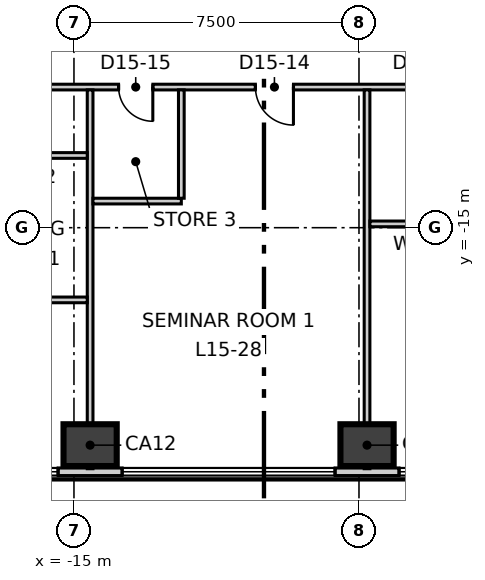
"""IFC4 building model, lengths in metres.
Left out: names, types, materials, properties, quantities, classifications, styles, units other than length and angle.
Written with IfcOpenShell. Run it as: python <this file> out.ifc"""

import sys

from ifc_helpers import new_model, si_unit, direction, frame, frame_2d, origin, origin_2d, place, context, subcontext, project, spatial, rectangle, extrude, element, fill, save


model = new_model("IFC4")
c1 = context("Model", 3, precision=1e-05, world=origin(), true_north=direction((0.0, 1.0)))
c2 = subcontext(c1, "Body", "Model", "MODEL_VIEW")
j1 = project(units=[si_unit("LENGTHUNIT", "METRE"), si_unit("PLANEANGLEUNIT", "RADIAN")], contexts=[c1])
p1 = place(None, origin())
s1 = spatial("IfcSite", under=j1, at=p1, CompositionType="ELEMENT")
p2 = place(p1, origin())
s2 = spatial("IfcBuilding", under=s1, at=p2, CompositionType="ELEMENT")
p3 = place(p2, frame((0.0, 0.0, 71.3)))
s3 = spatial("IfcBuildingStorey", under=s2, at=p3, CompositionType="ELEMENT", Elevation=71.3)
for number, where, z_axis, x_axis in (
    (1, (-14.575, -20.722, -0.3), (0.0, 0.0, 1.0), (1.0, 0.0, 0.0)),
    (2, (-7.288, -20.722, -0.3), (0.0, 0.0, 1.0), (1.0, 0.0, 0.0)),
):
    element("IfcColumn", number, at=place(p3, frame(where, z_axis=z_axis, x_axis=x_axis)), inside=s3, PredefinedType="COLUMN", context=c2, shape_type="SweptSolid", body=[
        extrude(rectangle(XDim=1.4, YDim=1.1, at=origin_2d()), origin(), (0.0, 0.0, 1.0), 4.0),
    ])
p4 = place(p3, frame((-3.326, 37.084, 0.0), z_axis=(0.0, 0.0, 1.0), x_axis=(-0.500000131003, -0.86602532815, 0.0)))
e3 = element("IfcWall", 3, at=p4, inside=s3, PredefinedType="ELEMENTEDWALL", context=c2, shape_type="SweptSolid", body=[
    extrude(rectangle(XDim=60.886, YDim=0.2, at=frame_2d((30.443, 0.0))), origin(), (0.0, 0.0, 1.0), 3.7),
])
p5 = place(p4, frame((2.146, 0.0, 0.9)))
e4 = element("IfcOpeningElement", 4, at=p5, cuts=e3, PredefinedType="OPENING", context=c2, shape_type="SweptSolid", body=[
    extrude(rectangle(XDim=5.6, YDim=2.5, at=frame_2d((2.8, 1.25))), frame((0.0, 0.11, 0.0), z_axis=(0.0, -1.0, 0.0), x_axis=(1.0, 0.0, 0.0)), (0.0, 0.0, 1.0), 0.22),
])
p6 = place(p4, frame((9.434, 0.0, 0.9)))
e5 = element("IfcOpeningElement", 5, at=p6, cuts=e3, PredefinedType="OPENING", context=c2, shape_type="SweptSolid", body=[
    extrude(rectangle(XDim=5.6, YDim=2.5, at=frame_2d((2.8, 1.25))), frame((0.0, 0.11, 0.0), z_axis=(0.0, -1.0, 0.0), x_axis=(1.0, 0.0, 0.0)), (0.0, 0.0, 1.0), 0.22),
])
p7 = place(p4, frame((16.721, 0.0, 0.9)))
e6 = element("IfcOpeningElement", 6, at=p7, cuts=e3, PredefinedType="OPENING", context=c2, shape_type="SweptSolid", body=[
    extrude(rectangle(XDim=5.6, YDim=2.5, at=frame_2d((2.8, 1.25))), frame((0.0, 0.11, 0.0), z_axis=(0.0, -1.0, 0.0), x_axis=(1.0, 0.0, 0.0)), (0.0, 0.0, 1.0), 0.22),
])
p8 = place(p4, frame((24.009, 0.0, 0.9)))
e7 = element("IfcOpeningElement", 7, at=p8, cuts=e3, PredefinedType="OPENING", context=c2, shape_type="SweptSolid", body=[
    extrude(rectangle(XDim=5.6, YDim=2.5, at=frame_2d((2.8, 1.25))), frame((0.0, 0.11, 0.0), z_axis=(0.0, -1.0, 0.0), x_axis=(1.0, 0.0, 0.0)), (0.0, 0.0, 1.0), 0.22),
])
p9 = place(p4, frame((31.297, 0.0, 0.9)))
e8 = element("IfcOpeningElement", 8, at=p9, cuts=e3, PredefinedType="OPENING", context=c2, shape_type="SweptSolid", body=[
    extrude(rectangle(XDim=5.6, YDim=2.5, at=frame_2d((2.8, 1.25))), frame((0.0, 0.11, 0.0), z_axis=(0.0, -1.0, 0.0), x_axis=(1.0, 0.0, 0.0)), (0.0, 0.0, 1.0), 0.22),
])
p10 = place(p4, frame((38.584, 0.0, 0.9)))
e9 = element("IfcOpeningElement", 9, at=p10, cuts=e3, PredefinedType="OPENING", context=c2, shape_type="SweptSolid", body=[
    extrude(rectangle(XDim=5.6, YDim=2.5, at=frame_2d((2.8, 1.25))), frame((0.0, 0.11, 0.0), z_axis=(0.0, -1.0, 0.0), x_axis=(1.0, 0.0, 0.0)), (0.0, 0.0, 1.0), 0.22),
])
p11 = place(p4, frame((45.872, 0.0, 0.9)))
e10 = element("IfcOpeningElement", 10, at=p11, cuts=e3, PredefinedType="OPENING", context=c2, shape_type="SweptSolid", body=[
    extrude(rectangle(XDim=5.6, YDim=2.5, at=frame_2d((2.8, 1.25))), frame((0.0, 0.11, 0.0), z_axis=(0.0, -1.0, 0.0), x_axis=(1.0, 0.0, 0.0)), (0.0, 0.0, 1.0), 0.22),
])
p12 = place(p4, frame((53.159, 0.0, 0.9)))
e11 = element("IfcOpeningElement", 11, at=p12, cuts=e3, PredefinedType="OPENING", context=c2, shape_type="SweptSolid", body=[
    extrude(rectangle(XDim=5.6, YDim=2.5, at=frame_2d((2.8, 1.25))), frame((0.0, 0.11, 0.0), z_axis=(0.0, -1.0, 0.0), x_axis=(1.0, 0.0, 0.0)), (0.0, 0.0, 1.0), 0.22),
])
p13 = place(p3, frame((-30.453, -21.422, 0.0), z_axis=(0.0, 0.0, 1.0), x_axis=(1.0, 0.0, 0.0)))
e12 = element("IfcWall", 12, at=p13, inside=s3, PredefinedType="ELEMENTEDWALL", context=c2, shape_type="SweptSolid", body=[
    extrude(rectangle(XDim=60.886, YDim=0.2, at=frame_2d((30.443, 0.0))), origin(), (0.0, 0.0, 1.0), 3.7),
])
p14 = place(p13, frame((2.147, 0.0, 0.9)))
e13 = element("IfcOpeningElement", 13, at=p14, cuts=e12, PredefinedType="OPENING", context=c2, shape_type="SweptSolid", body=[
    extrude(rectangle(XDim=5.6, YDim=2.5, at=frame_2d((2.8, 1.25))), frame((0.0, 0.11, 0.0), z_axis=(0.0, -1.0, 0.0), x_axis=(1.0, 0.0, 0.0)), (0.0, 0.0, 1.0), 0.22),
])
p15 = place(p13, frame((9.434, 0.0, 0.9)))
e14 = element("IfcOpeningElement", 14, at=p15, cuts=e12, PredefinedType="OPENING", context=c2, shape_type="SweptSolid", body=[
    extrude(rectangle(XDim=5.6, YDim=2.5, at=frame_2d((2.8, 1.25))), frame((0.0, 0.11, 0.0), z_axis=(0.0, -1.0, 0.0), x_axis=(1.0, 0.0, 0.0)), (0.0, 0.0, 1.0), 0.22),
])
p16 = place(p13, frame((16.722, 0.0, 0.9)))
e15 = element("IfcOpeningElement", 15, at=p16, cuts=e12, PredefinedType="OPENING", context=c2, shape_type="SweptSolid", body=[
    extrude(rectangle(XDim=5.6, YDim=2.5, at=frame_2d((2.8, 1.25))), frame((0.0, 0.11, 0.0), z_axis=(0.0, -1.0, 0.0), x_axis=(1.0, 0.0, 0.0)), (0.0, 0.0, 1.0), 0.22),
])
p17 = place(p13, frame((24.009, 0.0, 0.9)))
e16 = element("IfcOpeningElement", 16, at=p17, cuts=e12, PredefinedType="OPENING", context=c2, shape_type="SweptSolid", body=[
    extrude(rectangle(XDim=5.6, YDim=2.5, at=frame_2d((2.8, 1.25))), frame((0.0, 0.11, 0.0), z_axis=(0.0, -1.0, 0.0), x_axis=(1.0, 0.0, 0.0)), (0.0, 0.0, 1.0), 0.22),
])
p18 = place(p13, frame((31.297, 0.0, 0.9)))
e17 = element("IfcOpeningElement", 17, at=p18, cuts=e12, PredefinedType="OPENING", context=c2, shape_type="SweptSolid", body=[
    extrude(rectangle(XDim=5.6, YDim=2.5, at=frame_2d((2.8, 1.25))), frame((0.0, 0.11, 0.0), z_axis=(0.0, -1.0, 0.0), x_axis=(1.0, 0.0, 0.0)), (0.0, 0.0, 1.0), 0.22),
])
p19 = place(p13, frame((38.584, 0.0, 0.9)))
e18 = element("IfcOpeningElement", 18, at=p19, cuts=e12, PredefinedType="OPENING", context=c2, shape_type="SweptSolid", body=[
    extrude(rectangle(XDim=5.6, YDim=2.5, at=frame_2d((2.8, 1.25))), frame((0.0, 0.11, 0.0), z_axis=(0.0, -1.0, 0.0), x_axis=(1.0, 0.0, 0.0)), (0.0, 0.0, 1.0), 0.22),
])
p20 = place(p13, frame((45.872, 0.0, 0.9)))
e19 = element("IfcOpeningElement", 19, at=p20, cuts=e12, PredefinedType="OPENING", context=c2, shape_type="SweptSolid", body=[
    extrude(rectangle(XDim=5.6, YDim=2.5, at=frame_2d((2.8, 1.25))), frame((0.0, 0.11, 0.0), z_axis=(0.0, -1.0, 0.0), x_axis=(1.0, 0.0, 0.0)), (0.0, 0.0, 1.0), 0.22),
])
p21 = place(p13, frame((53.159, 0.0, 0.9)))
e20 = element("IfcOpeningElement", 20, at=p21, cuts=e12, PredefinedType="OPENING", context=c2, shape_type="SweptSolid", body=[
    extrude(rectangle(XDim=5.6, YDim=2.5, at=frame_2d((2.8, 1.25))), frame((0.0, 0.11, 0.0), z_axis=(0.0, -1.0, 0.0), x_axis=(1.0, 0.0, 0.0)), (0.0, 0.0, 1.0), 0.22),
])
p22 = place(p3, frame((-19.497, -11.17, 0.0), z_axis=(0.0, 0.0, 1.0), x_axis=(0.499998854553, 0.866026065108, 0.0)))
e21 = element("IfcWall", 21, at=p22, inside=s3, PredefinedType="PARTITIONING", context=c2, shape_type="SweptSolid", body=[
    extrude(rectangle(XDim=38.994, YDim=0.15, at=frame_2d((19.497, 0.0))), origin(), (0.0, 0.0, 1.0), 3.7),
])
p23 = place(p22, frame((35.944, 0.0, 0.0)))
e22 = element("IfcOpeningElement", 22, at=p23, cuts=e21, PredefinedType="OPENING", context=c2, shape_type="SweptSolid", body=[
    extrude(rectangle(XDim=1.1, YDim=2.1, at=frame_2d((0.55, 1.05))), frame((0.0, 0.085, 0.0), z_axis=(0.0, -1.0, 0.0), x_axis=(1.0, 0.0, 0.0)), (0.0, 0.0, 1.0), 0.17),
])
p24 = place(p22, frame((26.148, 0.0, 0.0)))
e23 = element("IfcOpeningElement", 23, at=p24, cuts=e21, PredefinedType="OPENING", context=c2, shape_type="SweptSolid", body=[
    extrude(rectangle(XDim=1.1, YDim=2.1, at=frame_2d((0.55, 1.05))), frame((0.0, 0.085, 0.0), z_axis=(0.0, -1.0, 0.0), x_axis=(1.0, 0.0, 0.0)), (0.0, 0.0, 1.0), 0.17),
])
p25 = place(p22, frame((8.572, 0.0, 0.0)))
e24 = element("IfcOpeningElement", 24, at=p25, cuts=e21, PredefinedType="OPENING", context=c2, shape_type="SweptSolid", body=[
    extrude(rectangle(XDim=1.1, YDim=2.1, at=frame_2d((0.55, 1.05))), frame((0.0, 0.085, 0.0), z_axis=(0.0, -1.0, 0.0), x_axis=(1.0, 0.0, 0.0)), (0.0, 0.0, 1.0), 0.17),
])
p26 = place(p22, frame((17.172, 0.0, 0.0)))
e25 = element("IfcOpeningElement", 25, at=p26, cuts=e21, PredefinedType="OPENING", context=c2, shape_type="SweptSolid", body=[
    extrude(rectangle(XDim=0.9, YDim=2.1, at=frame_2d((0.45, 1.05))), frame((0.0, 0.085, 0.0), z_axis=(0.0, -1.0, 0.0), x_axis=(1.0, 0.0, 0.0)), (0.0, 0.0, 1.0), 0.17),
])
p27 = place(p22, frame((14.172, 0.0, 0.0)))
e26 = element("IfcOpeningElement", 26, at=p27, cuts=e21, PredefinedType="OPENING", context=c2, shape_type="SweptSolid", body=[
    extrude(rectangle(XDim=0.9, YDim=2.1, at=frame_2d((0.45, 1.05))), frame((0.0, 0.085, 0.0), z_axis=(0.0, -1.0, 0.0), x_axis=(1.0, 0.0, 0.0)), (0.0, 0.0, 1.0), 0.17),
])
p28 = place(p22, frame((1.797, 0.0, 0.0)))
e27 = element("IfcOpeningElement", 27, at=p28, cuts=e21, PredefinedType="OPENING", context=c2, shape_type="SweptSolid", body=[
    extrude(rectangle(XDim=1.1, YDim=2.1, at=frame_2d((0.55, 1.05))), frame((0.0, 0.085, 0.0), z_axis=(0.0, -1.0, 0.0), x_axis=(1.0, 0.0, 0.0)), (0.0, 0.0, 1.0), 0.17),
])
p29 = place(p3, frame((-19.422, -11.3, 0.0), z_axis=(0.0, 0.0, 1.0), x_axis=(1.0, 0.0, 0.0)))
e28 = element("IfcWall", 28, at=p29, inside=s3, PredefinedType="PARTITIONING", context=c2, shape_type="SweptSolid", body=[
    extrude(rectangle(XDim=38.994, YDim=0.15, at=frame_2d((19.497, 0.0))), origin(), (0.0, 0.0, 1.0), 3.7),
])
p30 = place(p29, frame((1.8, 0.0, 0.0)))
e29 = element("IfcOpeningElement", 29, at=p30, cuts=e28, PredefinedType="OPENING", context=c2, shape_type="SweptSolid", body=[
    extrude(rectangle(XDim=1.1, YDim=2.1, at=frame_2d((0.55, 1.05))), frame((0.0, 0.085, 0.0), z_axis=(0.0, -1.0, 0.0), x_axis=(1.0, 0.0, 0.0)), (0.0, 0.0, 1.0), 0.17),
])
p31 = place(p29, frame((9.197, 0.0, 0.0)))
e30 = element("IfcOpeningElement", 30, at=p31, cuts=e28, PredefinedType="OPENING", context=c2, shape_type="SweptSolid", body=[
    extrude(rectangle(XDim=1.0, YDim=2.1, at=frame_2d((0.5, 1.05))), frame((0.0, 0.085, 0.0), z_axis=(0.0, -1.0, 0.0), x_axis=(1.0, 0.0, 0.0)), (0.0, 0.0, 1.0), 0.17),
])
p32 = place(p29, frame((5.597, 0.0, 0.0)))
e31 = element("IfcOpeningElement", 31, at=p32, cuts=e28, PredefinedType="OPENING", context=c2, shape_type="SweptSolid", body=[
    extrude(rectangle(XDim=0.9, YDim=2.1, at=frame_2d((0.45, 1.05))), frame((0.0, 0.085, 0.0), z_axis=(0.0, -1.0, 0.0), x_axis=(1.0, 0.0, 0.0)), (0.0, 0.0, 1.0), 0.17),
])
p33 = place(p29, frame((23.284, 0.0, 0.0)))
e32 = element("IfcOpeningElement", 32, at=p33, cuts=e28, PredefinedType="OPENING", context=c2, shape_type="SweptSolid", body=[
    extrude(rectangle(XDim=1.1, YDim=2.1, at=frame_2d((0.55, 1.05))), frame((0.0, 0.085, 0.0), z_axis=(0.0, -1.0, 0.0), x_axis=(1.0, 0.0, 0.0)), (0.0, 0.0, 1.0), 0.17),
])
p34 = place(p29, frame((13.284, 0.0, 0.0)))
e33 = element("IfcOpeningElement", 33, at=p34, cuts=e28, PredefinedType="OPENING", context=c2, shape_type="SweptSolid", body=[
    extrude(rectangle(XDim=0.9, YDim=2.1, at=frame_2d((0.45, 1.05))), frame((0.0, 0.085, 0.0), z_axis=(0.0, -1.0, 0.0), x_axis=(1.0, 0.0, 0.0)), (0.0, 0.0, 1.0), 0.17),
])
p35 = place(p29, frame((16.484, 0.0, 0.0)))
e34 = element("IfcOpeningElement", 34, at=p35, cuts=e28, PredefinedType="OPENING", context=c2, shape_type="SweptSolid", body=[
    extrude(rectangle(XDim=0.9, YDim=2.1, at=frame_2d((0.45, 1.05))), frame((0.0, 0.085, 0.0), z_axis=(0.0, -1.0, 0.0), x_axis=(1.0, 0.0, 0.0)), (0.0, 0.0, 1.0), 0.17),
])
p36 = place(p29, frame((19.184, 0.0, 0.0)))
e35 = element("IfcOpeningElement", 35, at=p36, cuts=e28, PredefinedType="OPENING", context=c2, shape_type="SweptSolid", body=[
    extrude(rectangle(XDim=1.0, YDim=2.1, at=frame_2d((0.5, 1.05))), frame((0.0, 0.085, 0.0), z_axis=(0.0, -1.0, 0.0), x_axis=(1.0, 0.0, 0.0)), (0.0, 0.0, 1.0), 0.17),
])
p37 = place(p29, frame((29.86, 0.0, 0.0)))
e36 = element("IfcOpeningElement", 36, at=p37, cuts=e28, PredefinedType="OPENING", context=c2, shape_type="SweptSolid", body=[
    extrude(rectangle(XDim=1.0, YDim=2.1, at=frame_2d((0.5, 1.05))), frame((0.0, 0.085, 0.0), z_axis=(0.0, -1.0, 0.0), x_axis=(1.0, 0.0, 0.0)), (0.0, 0.0, 1.0), 0.17),
])
p38 = place(p29, frame((35.947, 0.0, 0.0)))
e37 = element("IfcOpeningElement", 37, at=p38, cuts=e28, PredefinedType="OPENING", context=c2, shape_type="SweptSolid", body=[
    extrude(rectangle(XDim=1.0, YDim=2.1, at=frame_2d((0.5, 1.05))), frame((0.0, 0.085, 0.0), z_axis=(0.0, -1.0, 0.0), x_axis=(1.0, 0.0, 0.0)), (0.0, 0.0, 1.0), 0.17),
])
p39 = place(p3, frame((-14.575, -21.342, 0.0), z_axis=(0.0, 0.0, 1.0), x_axis=(0.0, 1.0, 0.0)))
e38 = element("IfcWall", 38, at=p39, inside=s3, PredefinedType="PARTITIONING", context=c2, shape_type="SweptSolid", body=[
    extrude(rectangle(XDim=9.967, YDim=0.15, at=frame_2d((4.983, 0.0))), origin(), (0.0, 0.0, 1.0), 3.7),
])
p40 = place(p3, frame((-14.5, -14.3, 0.0), z_axis=(0.0, 0.0, 1.0), x_axis=(1.0, 0.0, 0.0)))
e39 = element("IfcWall", 39, at=p40, inside=s3, PredefinedType="PARTITIONING", context=c2, shape_type="SweptSolid", body=[
    extrude(rectangle(XDim=2.325, YDim=0.15, at=frame_2d((1.163, 0.0))), origin(), (0.0, 0.0, 1.0), 3.7),
])
p41 = place(p3, frame((-12.175, -14.225, 0.0), z_axis=(0.0, 0.0, 1.0), x_axis=(0.0, 1.0, 0.0)))
e40 = element("IfcWall", 40, at=p41, inside=s3, PredefinedType="PARTITIONING", context=c2, shape_type="SweptSolid", body=[
    extrude(rectangle(XDim=2.85, YDim=0.15, at=frame_2d((1.425, 0.0))), origin(), (0.0, 0.0, 1.0), 3.7),
])
p42 = place(p3, frame((-7.288, -21.342, 0.0), z_axis=(0.0, 0.0, 1.0), x_axis=(0.0, 1.0, 0.0)))
e41 = element("IfcWall", 41, at=p42, inside=s3, PredefinedType="PARTITIONING", context=c2, shape_type="SweptSolid", body=[
    extrude(rectangle(XDim=9.967, YDim=0.15, at=frame_2d((4.983, 0.0))), origin(), (0.0, 0.0, 1.0), 3.7),
])
p43 = place(p3, frame((-7.213, -14.9, 0.0), z_axis=(0.0, 0.0, 1.0), x_axis=(1.0, 0.0, 0.0)))
e42 = element("IfcWall", 42, at=p43, inside=s3, PredefinedType="PARTITIONING", context=c2, shape_type="SweptSolid", body=[
    extrude(rectangle(XDim=8.725, YDim=0.15, at=frame_2d((4.362, 0.0))), origin(), (0.0, 0.0, 1.0), 3.7),
])
p44 = place(p3, frame((-20.375, -13.1, 0.0), z_axis=(0.0, 0.0, 1.0), x_axis=(1.0, 0.0, 0.0)))
e43 = element("IfcWall", 43, at=p44, inside=s3, PredefinedType="PARTITIONING", context=c2, shape_type="SweptSolid", body=[
    extrude(rectangle(XDim=5.725, YDim=0.15, at=frame_2d((2.863, 0.0))), origin(), (0.0, 0.0, 1.0), 3.7),
])
p45 = place(p44, frame((3.55, 0.0, 0.0)))
e44 = element("IfcOpeningElement", 44, at=p45, cuts=e43, PredefinedType="OPENING", context=c2, shape_type="SweptSolid", body=[
    extrude(rectangle(XDim=0.9, YDim=2.1, at=frame_2d((0.45, 1.05))), frame((0.0, 0.085, 0.0), z_axis=(0.0, -1.0, 0.0), x_axis=(1.0, 0.0, 0.0)), (0.0, 0.0, 1.0), 0.17),
])
p46 = place(p3, frame((-18.1, -16.9, 0.0), z_axis=(0.0, 0.0, 1.0), x_axis=(1.0, 0.0, 0.0)))
e45 = element("IfcWall", 45, at=p46, inside=s3, PredefinedType="PARTITIONING", context=c2, shape_type="SweptSolid", body=[
    extrude(rectangle(XDim=3.45, YDim=0.15, at=frame_2d((1.725, 0.0))), origin(), (0.0, 0.0, 1.0), 3.7),
])
p47 = place(p15, origin())
e46 = element("IfcWindow", 46, at=p47, inside=s3, PartitioningType="SINGLE_PANEL", PredefinedType="WINDOW", context=c2, shape_type="SweptSolid", body=[
    extrude(rectangle(XDim=5.6, YDim=2.5, at=frame_2d((2.8, 1.25))), frame((0.0, 0.03, 0.0), z_axis=(0.0, -1.0, 0.0), x_axis=(1.0, 0.0, 0.0)), (0.0, 0.0, 1.0), 0.06),
])
fill(e14, e46)
p48 = place(p16, origin())
e47 = element("IfcWindow", 47, at=p48, inside=s3, PartitioningType="SINGLE_PANEL", PredefinedType="WINDOW", context=c2, shape_type="SweptSolid", body=[
    extrude(rectangle(XDim=5.6, YDim=2.5, at=frame_2d((2.8, 1.25))), frame((0.0, 0.03, 0.0), z_axis=(0.0, -1.0, 0.0), x_axis=(1.0, 0.0, 0.0)), (0.0, 0.0, 1.0), 0.06),
])
fill(e15, e47)
p49 = place(p17, origin())
e48 = element("IfcWindow", 48, at=p49, inside=s3, PartitioningType="SINGLE_PANEL", PredefinedType="WINDOW", context=c2, shape_type="SweptSolid", body=[
    extrude(rectangle(XDim=5.6, YDim=2.5, at=frame_2d((2.8, 1.25))), frame((0.0, 0.03, 0.0), z_axis=(0.0, -1.0, 0.0), x_axis=(1.0, 0.0, 0.0)), (0.0, 0.0, 1.0), 0.06),
])
fill(e16, e48)
p50 = place(p31, origin())
e49 = element("IfcDoor", 49, at=p50, inside=s3, OperationType="SINGLE_SWING_RIGHT", PredefinedType="DOOR", context=c2, shape_type="SweptSolid", body=[
    extrude(rectangle(XDim=1.0, YDim=2.1, at=frame_2d((0.5, 1.05))), frame((0.0, 0.025, 0.0), z_axis=(0.0, -1.0, 0.0), x_axis=(1.0, 0.0, 0.0)), (0.0, 0.0, 1.0), 0.05),
])
fill(e30, e49)
p51 = place(p32, origin())
e50 = element("IfcDoor", 50, at=p51, inside=s3, OperationType="SINGLE_SWING_RIGHT", PredefinedType="DOOR", context=c2, shape_type="SweptSolid", body=[
    extrude(rectangle(XDim=0.9, YDim=2.1, at=frame_2d((0.45, 1.05))), frame((0.0, 0.025, 0.0), z_axis=(0.0, -1.0, 0.0), x_axis=(1.0, 0.0, 0.0)), (0.0, 0.0, 1.0), 0.05),
])
fill(e31, e50)
save(model, sys.argv[1])
